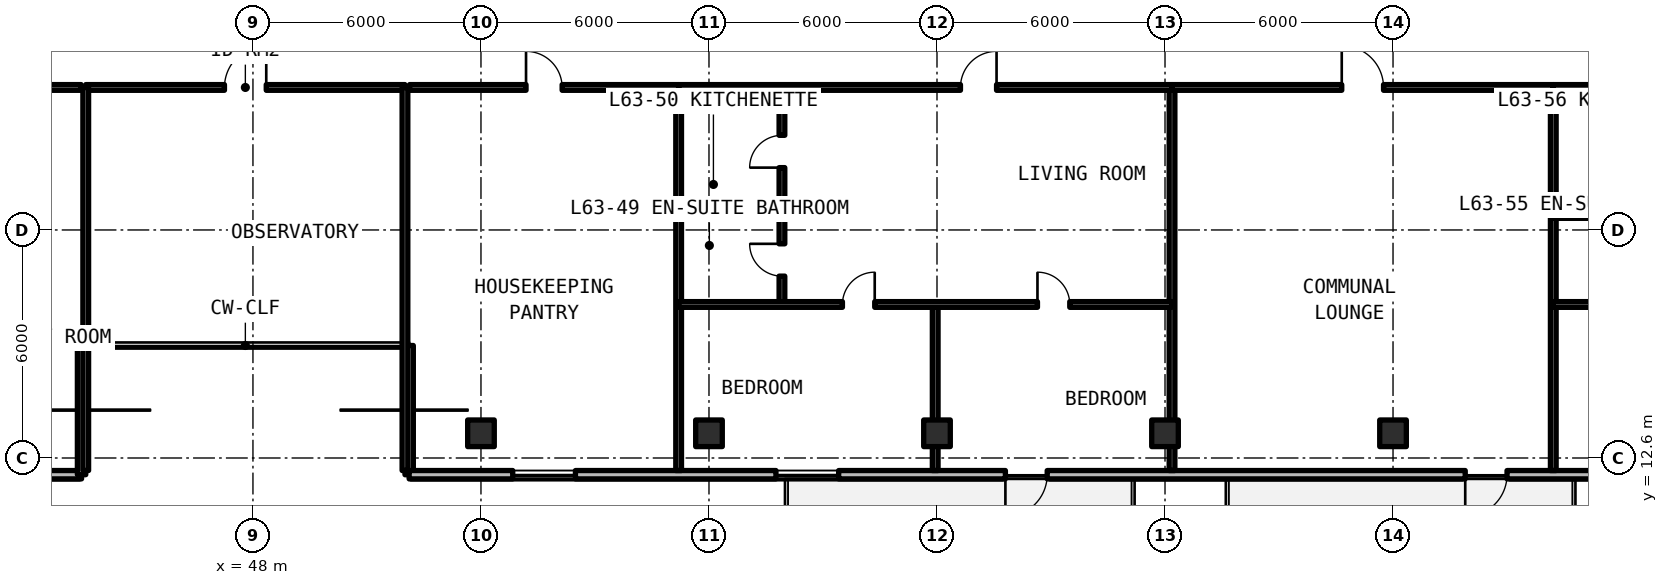
"""IFC4 building model, lengths in metres.
Left out: names, types, materials, properties, quantities, classifications, styles, units other than length and angle.
Written with IfcOpenShell. Run it as: python <this file> out.ifc"""

import sys

from ifc_helpers import new_model, si_unit, direction, frame, frame_2d, origin, origin_2d, place, context, subcontext, project, spatial, rectangle, extrude, element, fill, save


model = new_model("IFC4")
c1 = context("Model", 3, precision=1e-05, world=origin(), true_north=direction((0.0, 1.0)))
c2 = subcontext(c1, "Body", "Model", "MODEL_VIEW")
j1 = project(units=[si_unit("LENGTHUNIT", "METRE"), si_unit("PLANEANGLEUNIT", "RADIAN")], contexts=[c1])
p1 = place(None, origin())
s1 = spatial("IfcSite", under=j1, at=p1, CompositionType="ELEMENT")
p2 = place(p1, origin())
s2 = spatial("IfcBuilding", under=s1, at=p2, CompositionType="ELEMENT")
p3 = place(p2, frame((0.0, 0.0, 226.05)))
s3 = spatial("IfcBuildingStorey", under=s2, at=p3, CompositionType="ELEMENT", Elevation=226.05)
for number, where, z_axis, x_axis in (
    (1, (54.0, 13.25, 0.0), (0.0, 0.0, 1.0), (1.0, 0.0, 0.0)),
    (2, (60.0, 13.25, 0.0), (0.0, 0.0, 1.0), (1.0, 0.0, 0.0)),
    (3, (66.0, 13.25, 0.0), (0.0, 0.0, 1.0), (1.0, 0.0, 0.0)),
):
    element("IfcColumn", number, at=place(p3, frame(where, z_axis=z_axis, x_axis=x_axis)), inside=s3, PredefinedType="COLUMN", context=c2, shape_type="SweptSolid", body=[
        extrude(rectangle(XDim=0.7, YDim=0.7, at=origin_2d()), origin(), (0.0, 0.0, 1.0), 3.02),
    ])
for number, where, z_axis, x_axis in (
    (4, (72.0, 13.25, 0.0), (0.0, 0.0, 1.0), (1.0, 0.0, 0.0)),
    (5, (78.0, 13.25, 0.0), (0.0, 0.0, 1.0), (1.0, 0.0, 0.0)),
):
    element("IfcColumn", number, at=place(p3, frame(where, z_axis=z_axis, x_axis=x_axis)), inside=s3, PredefinedType="COLUMN", context=c2, shape_type="SweptSolid", body=[
        extrude(rectangle(XDim=0.7, YDim=0.7, at=origin_2d()), origin(), (0.0, 0.0, 1.0), 3.3),
    ])
p4 = place(p3, frame((25.846, 12.16, 0.0), z_axis=(0.0, 0.0, 1.0), x_axis=(1.0, 0.0, 0.0)))
e6 = element("IfcWall", 6, at=p4, inside=s3, PredefinedType="SOLIDWALL", context=c2, shape_type="SweptSolid", body=[
    extrude(rectangle(XDim=17.644, YDim=0.22, at=frame_2d((8.822, 0.0))), origin(), (0.0, 0.0, 1.0), 3.02),
])
p5 = place(p4, frame((5.904, 0.0, 0.0)))
e7 = element("IfcOpeningElement", 7, at=p5, cuts=e6, PredefinedType="OPENING", context=c2, shape_type="SweptSolid", body=[
    extrude(rectangle(XDim=1.1, YDim=2.15, at=frame_2d((0.55, 1.075))), frame((0.0, 0.12, 0.0), z_axis=(0.0, -1.0, 0.0), x_axis=(1.0, 0.0, 0.0)), (0.0, 0.0, 1.0), 0.24),
])
p6 = place(p4, frame((1.261, 0.0, 0.78)))
e8 = element("IfcOpeningElement", 8, at=p6, cuts=e6, PredefinedType="OPENING", context=c2, shape_type="SweptSolid", body=[
    extrude(rectangle(XDim=1.65, YDim=1.66, at=frame_2d((0.825, 0.83))), frame((0.0, 0.12, 0.0), z_axis=(0.0, -1.0, 0.0), x_axis=(1.0, 0.0, 0.0)), (0.0, 0.0, 1.0), 0.24),
])
p7 = place(p4, frame((11.45, 0.0, 0.78)))
e9 = element("IfcOpeningElement", 9, at=p7, cuts=e6, PredefinedType="OPENING", context=c2, shape_type="SweptSolid", body=[
    extrude(rectangle(XDim=1.65, YDim=1.66, at=frame_2d((0.825, 0.83))), frame((0.0, 0.12, 0.0), z_axis=(0.0, -1.0, 0.0), x_axis=(1.0, 0.0, 0.0)), (0.0, 0.0, 1.0), 0.24),
])
p8 = place(p4, frame((14.602, 0.0, 0.78)))
e10 = element("IfcOpeningElement", 10, at=p8, cuts=e6, PredefinedType="OPENING", context=c2, shape_type="SweptSolid", body=[
    extrude(rectangle(XDim=0.85, YDim=1.65, at=frame_2d((0.425, 0.825))), frame((0.0, 0.12, 0.0), z_axis=(0.0, -1.0, 0.0), x_axis=(1.0, 0.0, 0.0)), (0.0, 0.0, 1.0), 0.24),
])
for number, where, z_axis, x_axis in (
    (11, (43.49, 12.16, 0.0), (0.0, 0.0, 1.0), (0.0, 1.0, 0.0)),
    (12, (52.11, 15.56, 0.0), (0.0, 0.0, 1.0), (0.0, -1.0, 0.0)),
):
    element("IfcWall", number, at=place(p3, frame(where, z_axis=z_axis, x_axis=x_axis)), inside=s3, PredefinedType="SOLIDWALL", context=c2, shape_type="SweptSolid", body=[
        extrude(rectangle(XDim=3.4, YDim=0.22, at=frame_2d((1.7, 0.0))), origin(), (0.0, 0.0, 1.0), 3.02),
    ])
p9 = place(p3, frame((52.11, 12.16, 0.0), z_axis=(0.0, 0.0, 1.0), x_axis=(1.0, 0.0, 0.0)))
e13 = element("IfcWall", 13, at=p9, inside=s3, PredefinedType="SOLIDWALL", context=c2, shape_type="SweptSolid", body=[
    extrude(rectangle(XDim=43.244, YDim=0.22, at=frame_2d((21.622, 0.0))), origin(), (0.0, 0.0, 1.0), 3.02),
])
p10 = place(p9, frame((15.69, 0.0, 0.0)))
e14 = element("IfcOpeningElement", 14, at=p10, cuts=e13, PredefinedType="OPENING", context=c2, shape_type="SweptSolid", body=[
    extrude(rectangle(XDim=1.1, YDim=2.15, at=frame_2d((0.55, 1.075))), frame((0.0, 0.12, 0.0), z_axis=(0.0, -1.0, 0.0), x_axis=(1.0, 0.0, 0.0)), (0.0, 0.0, 1.0), 0.24),
])
p11 = place(p9, frame((27.79, 0.0, 0.0)))
e15 = element("IfcOpeningElement", 15, at=p11, cuts=e13, PredefinedType="OPENING", context=c2, shape_type="SweptSolid", body=[
    extrude(rectangle(XDim=1.1, YDim=2.15, at=frame_2d((0.55, 1.075))), frame((0.0, 0.12, 0.0), z_axis=(0.0, -1.0, 0.0), x_axis=(1.0, 0.0, 0.0)), (0.0, 0.0, 1.0), 0.24),
])
p12 = place(p9, frame((2.726, 0.0, 0.78)))
e16 = element("IfcOpeningElement", 16, at=p12, cuts=e13, PredefinedType="OPENING", context=c2, shape_type="SweptSolid", body=[
    extrude(rectangle(XDim=1.65, YDim=1.66, at=frame_2d((0.825, 0.83))), frame((0.0, 0.12, 0.0), z_axis=(0.0, -1.0, 0.0), x_axis=(1.0, 0.0, 0.0)), (0.0, 0.0, 1.0), 0.24),
])
p13 = place(p9, frame((9.652, 0.0, 0.78)))
e17 = element("IfcOpeningElement", 17, at=p13, cuts=e13, PredefinedType="OPENING", context=c2, shape_type="SweptSolid", body=[
    extrude(rectangle(XDim=1.65, YDim=1.66, at=frame_2d((0.825, 0.83))), frame((0.0, 0.12, 0.0), z_axis=(0.0, -1.0, 0.0), x_axis=(1.0, 0.0, 0.0)), (0.0, 0.0, 1.0), 0.24),
])
p14 = place(p9, frame((32.667, 0.0, 0.78)))
e18 = element("IfcOpeningElement", 18, at=p14, cuts=e13, PredefinedType="OPENING", context=c2, shape_type="SweptSolid", body=[
    extrude(rectangle(XDim=1.65, YDim=1.66, at=frame_2d((0.825, 0.83))), frame((0.0, 0.12, 0.0), z_axis=(0.0, -1.0, 0.0), x_axis=(1.0, 0.0, 0.0)), (0.0, 0.0, 1.0), 0.24),
])
p15 = place(p9, frame((39.139, 0.0, 0.78)))
e19 = element("IfcOpeningElement", 19, at=p15, cuts=e13, PredefinedType="OPENING", context=c2, shape_type="SweptSolid", body=[
    extrude(rectangle(XDim=1.65, YDim=1.66, at=frame_2d((0.825, 0.83))), frame((0.0, 0.12, 0.0), z_axis=(0.0, -1.0, 0.0), x_axis=(1.0, 0.0, 0.0)), (0.0, 0.0, 1.0), 0.24),
])
p16 = place(p3, frame((43.6, 22.35, 0.0), z_axis=(0.0, 0.0, 1.0), x_axis=(1.0, 0.0, 0.0)))
e20 = element("IfcWall", 20, at=p16, inside=s3, PredefinedType="SOLIDWALL", context=c2, shape_type="SweptSolid", body=[
    extrude(rectangle(XDim=8.4, YDim=0.15, at=frame_2d((4.2, 0.0))), origin(), (0.0, 0.0, 1.0), 2.35),
])
p17 = place(p16, frame((3.65, 0.0, 0.0)))
e21 = element("IfcOpeningElement", 21, at=p17, cuts=e20, PredefinedType="OPENING", context=c2, shape_type="SweptSolid", body=[
    extrude(rectangle(XDim=1.1, YDim=2.15, at=frame_2d((0.55, 1.075))), frame((0.0, 0.085, 0.0), z_axis=(0.0, -1.0, 0.0), x_axis=(1.0, 0.0, 0.0)), (0.0, 0.0, 1.0), 0.17),
])
for number, where, z_axis, x_axis in (
    (22, (43.6, 12.27, 0.0), (0.0, 0.0, 1.0), (0.0, 1.0, 0.0)),
    (23, (52.0, 12.27, 0.0), (0.0, 0.0, 1.0), (0.0, 1.0, 0.0)),
):
    element("IfcWall", number, at=place(p3, frame(where, z_axis=z_axis, x_axis=x_axis)), inside=s3, PredefinedType="SOLIDWALL", context=c2, shape_type="SweptSolid", body=[
        extrude(rectangle(XDim=10.08, YDim=0.15, at=frame_2d((5.04, 0.0))), origin(), (0.0, 0.0, 1.0), 2.35),
    ])
p18 = place(p3, frame((39.866, 22.35, 0.0), z_axis=(0.0, 0.0, 1.0), x_axis=(1.0, 0.0, 0.0)))
e24 = element("IfcWall", 24, at=p18, inside=s3, PredefinedType="SOLIDWALL", context=c2, shape_type="SweptSolid", body=[
    extrude(rectangle(XDim=3.614, YDim=0.15, at=frame_2d((1.807, 0.0))), origin(), (0.0, 0.0, 1.0), 2.35),
])
p19 = place(p18, frame((1.332, 0.0, 0.0)))
e25 = element("IfcOpeningElement", 25, at=p19, cuts=e24, PredefinedType="OPENING", context=c2, shape_type="SweptSolid", body=[
    extrude(rectangle(XDim=0.95, YDim=2.15, at=frame_2d((0.475, 1.075))), frame((0.0, 0.085, 0.0), z_axis=(0.0, -1.0, 0.0), x_axis=(1.0, 0.0, 0.0)), (0.0, 0.0, 1.0), 0.17),
])
p20 = place(p3, frame((59.202, 12.27, 0.0), z_axis=(0.0, 0.0, 1.0), x_axis=(0.0, 1.0, 0.0)))
e26 = element("IfcWall", 26, at=p20, inside=s3, PredefinedType="SOLIDWALL", context=c2, shape_type="SweptSolid", body=[
    extrude(rectangle(XDim=10.08, YDim=0.15, at=frame_2d((5.04, 0.0))), origin(), (0.0, 0.0, 1.0), 2.35),
])
p21 = place(p3, frame((52.12, 22.35, 0.0), z_axis=(0.0, 0.0, 1.0), x_axis=(1.0, 0.0, 0.0)))
e27 = element("IfcWall", 27, at=p21, inside=s3, PredefinedType="SOLIDWALL", context=c2, shape_type="SweptSolid", body=[
    extrude(rectangle(XDim=7.082, YDim=0.15, at=frame_2d((3.541, 0.0))), origin(), (0.0, 0.0, 1.0), 2.35),
])
p22 = place(p21, frame((3.066, 0.0, 0.0)))
e28 = element("IfcOpeningElement", 28, at=p22, cuts=e27, PredefinedType="OPENING", context=c2, shape_type="SweptSolid", body=[
    extrude(rectangle(XDim=0.95, YDim=2.15, at=frame_2d((0.475, 1.075))), frame((0.0, 0.085, 0.0), z_axis=(0.0, -1.0, 0.0), x_axis=(1.0, 0.0, 0.0)), (0.0, 0.0, 1.0), 0.17),
])
p23 = place(p3, frame((72.185, 12.27, 0.0), z_axis=(0.0, 0.0, 1.0), x_axis=(0.0, 1.0, 0.0)))
e29 = element("IfcWall", 29, at=p23, inside=s3, PredefinedType="SOLIDWALL", context=c2, shape_type="SweptSolid", body=[
    extrude(rectangle(XDim=10.08, YDim=0.15, at=frame_2d((5.04, 0.0))), origin(), (0.0, 0.0, 1.0), 2.35),
])
p24 = place(p3, frame((59.202, 18.981, 0.0), z_axis=(0.0, 0.0, 1.0), x_axis=(1.0, 0.0, 0.0)))
e30 = element("IfcWall", 30, at=p24, inside=s3, PredefinedType="PARTITIONING", context=c2, shape_type="SweptSolid", body=[
    extrude(rectangle(XDim=2.718, YDim=0.15, at=frame_2d((1.359, 0.0))), origin(), (0.0, 0.0, 1.0), 2.35),
])
p25 = place(p3, frame((61.92, 16.64, 0.0), z_axis=(0.0, 0.0, 1.0), x_axis=(0.0, 1.0, 0.0)))
e31 = element("IfcWall", 31, at=p25, inside=s3, PredefinedType="PARTITIONING", context=c2, shape_type="SweptSolid", body=[
    extrude(rectangle(XDim=5.71, YDim=0.15, at=frame_2d((2.855, 0.0))), origin(), (0.0, 0.0, 1.0), 2.35),
])
p26 = place(p25, frame((0.746, 0.0, 0.0)))
e32 = element("IfcOpeningElement", 32, at=p26, cuts=e31, PredefinedType="OPENING", context=c2, shape_type="SweptSolid", body=[
    extrude(rectangle(XDim=0.85, YDim=2.1, at=frame_2d((0.425, 1.05))), frame((0.0, 0.085, 0.0), z_axis=(0.0, -1.0, 0.0), x_axis=(1.0, 0.0, 0.0)), (0.0, 0.0, 1.0), 0.17),
])
p27 = place(p25, frame((3.601, 0.0, 0.0)))
e33 = element("IfcOpeningElement", 33, at=p27, cuts=e31, PredefinedType="OPENING", context=c2, shape_type="SweptSolid", body=[
    extrude(rectangle(XDim=0.85, YDim=2.1, at=frame_2d((0.425, 1.05))), frame((0.0, 0.085, 0.0), z_axis=(0.0, -1.0, 0.0), x_axis=(1.0, 0.0, 0.0)), (0.0, 0.0, 1.0), 0.17),
])
p28 = place(p3, frame((65.953, 12.27, 0.0), z_axis=(0.0, 0.0, 1.0), x_axis=(0.0, 1.0, 0.0)))
e34 = element("IfcWall", 34, at=p28, inside=s3, PredefinedType="PARTITIONING", context=c2, shape_type="SweptSolid", body=[
    extrude(rectangle(XDim=4.37, YDim=0.15, at=frame_2d((2.185, 0.0))), origin(), (0.0, 0.0, 1.0), 2.35),
])
p29 = place(p3, frame((59.202, 16.64, 0.0), z_axis=(0.0, 0.0, 1.0), x_axis=(1.0, 0.0, 0.0)))
e35 = element("IfcWall", 35, at=p29, inside=s3, PredefinedType="PARTITIONING", context=c2, shape_type="SweptSolid", body=[
    extrude(rectangle(XDim=12.983, YDim=0.15, at=frame_2d((6.491, 0.0))), origin(), (0.0, 0.0, 1.0), 2.35),
])
p30 = place(p29, frame((4.31, 0.0, 0.0)))
e36 = element("IfcOpeningElement", 36, at=p30, cuts=e35, PredefinedType="OPENING", context=c2, shape_type="SweptSolid", body=[
    extrude(rectangle(XDim=0.85, YDim=2.1, at=frame_2d((0.425, 1.05))), frame((0.0, 0.085, 0.0), z_axis=(0.0, -1.0, 0.0), x_axis=(1.0, 0.0, 0.0)), (0.0, 0.0, 1.0), 0.17),
])
p31 = place(p29, frame((9.442, 0.0, 0.0)))
e37 = element("IfcOpeningElement", 37, at=p31, cuts=e35, PredefinedType="OPENING", context=c2, shape_type="SweptSolid", body=[
    extrude(rectangle(XDim=0.85, YDim=2.1, at=frame_2d((0.425, 1.05))), frame((0.0, 0.085, 0.0), z_axis=(0.0, -1.0, 0.0), x_axis=(1.0, 0.0, 0.0)), (0.0, 0.0, 1.0), 0.17),
])
p32 = place(p3, frame((59.202, 22.35, 0.0), z_axis=(0.0, 0.0, 1.0), x_axis=(1.0, 0.0, 0.0)))
e38 = element("IfcWall", 38, at=p32, inside=s3, PredefinedType="SOLIDWALL", context=c2, shape_type="SweptSolid", body=[
    extrude(rectangle(XDim=12.983, YDim=0.15, at=frame_2d((6.491, 0.0))), origin(), (0.0, 0.0, 1.0), 2.35),
])
p33 = place(p32, frame((7.416, 0.0, 0.0)))
e39 = element("IfcOpeningElement", 39, at=p33, cuts=e38, PredefinedType="OPENING", context=c2, shape_type="SweptSolid", body=[
    extrude(rectangle(XDim=0.95, YDim=2.15, at=frame_2d((0.475, 1.075))), frame((0.0, 0.085, 0.0), z_axis=(0.0, -1.0, 0.0), x_axis=(1.0, 0.0, 0.0)), (0.0, 0.0, 1.0), 0.17),
])
p34 = place(p3, frame((82.217, 12.27, 0.0), z_axis=(0.0, 0.0, 1.0), x_axis=(0.0, 1.0, 0.0)))
e40 = element("IfcWall", 40, at=p34, inside=s3, PredefinedType="SOLIDWALL", context=c2, shape_type="SweptSolid", body=[
    extrude(rectangle(XDim=10.08, YDim=0.15, at=frame_2d((5.04, 0.0))), origin(), (0.0, 0.0, 1.0), 2.35),
])
p35 = place(p3, frame((72.185, 22.35, 0.0), z_axis=(0.0, 0.0, 1.0), x_axis=(1.0, 0.0, 0.0)))
e41 = element("IfcWall", 41, at=p35, inside=s3, PredefinedType="SOLIDWALL", context=c2, shape_type="SweptSolid", body=[
    extrude(rectangle(XDim=10.032, YDim=0.15, at=frame_2d((5.016, 0.0))), origin(), (0.0, 0.0, 1.0), 2.35),
])
p36 = place(p35, frame((4.466, 0.0, 0.0)))
e42 = element("IfcOpeningElement", 42, at=p36, cuts=e41, PredefinedType="OPENING", context=c2, shape_type="SweptSolid", body=[
    extrude(rectangle(XDim=1.1, YDim=2.15, at=frame_2d((0.55, 1.075))), frame((0.0, 0.085, 0.0), z_axis=(0.0, -1.0, 0.0), x_axis=(1.0, 0.0, 0.0)), (0.0, 0.0, 1.0), 0.17),
])
p37 = place(p3, frame((82.217, 18.981, 0.0), z_axis=(0.0, 0.0, 1.0), x_axis=(1.0, 0.0, 0.0)))
e43 = element("IfcWall", 43, at=p37, inside=s3, PredefinedType="PARTITIONING", context=c2, shape_type="SweptSolid", body=[
    extrude(rectangle(XDim=3.703, YDim=0.15, at=frame_2d((1.852, 0.0))), origin(), (0.0, 0.0, 1.0), 2.35),
])
p38 = place(p3, frame((82.217, 16.64, 0.0), z_axis=(0.0, 0.0, 1.0), x_axis=(1.0, 0.0, 0.0)))
e44 = element("IfcWall", 44, at=p38, inside=s3, PredefinedType="PARTITIONING", context=c2, shape_type="SweptSolid", body=[
    extrude(rectangle(XDim=12.983, YDim=0.15, at=frame_2d((6.492, 0.0))), origin(), (0.0, 0.0, 1.0), 2.35),
])
p39 = place(p38, frame((4.802, 0.0, 0.0)))
e45 = element("IfcOpeningElement", 45, at=p39, cuts=e44, PredefinedType="OPENING", context=c2, shape_type="SweptSolid", body=[
    extrude(rectangle(XDim=0.85, YDim=2.1, at=frame_2d((0.425, 1.05))), frame((0.0, 0.085, 0.0), z_axis=(0.0, -1.0, 0.0), x_axis=(1.0, 0.0, 0.0)), (0.0, 0.0, 1.0), 0.17),
])
p40 = place(p38, frame((9.442, 0.0, 0.0)))
e46 = element("IfcOpeningElement", 46, at=p40, cuts=e44, PredefinedType="OPENING", context=c2, shape_type="SweptSolid", body=[
    extrude(rectangle(XDim=0.85, YDim=2.1, at=frame_2d((0.425, 1.05))), frame((0.0, 0.085, 0.0), z_axis=(0.0, -1.0, 0.0), x_axis=(1.0, 0.0, 0.0)), (0.0, 0.0, 1.0), 0.17),
])
p41 = place(p3, frame((82.217, 22.35, 0.0), z_axis=(0.0, 0.0, 1.0), x_axis=(1.0, 0.0, 0.0)))
e47 = element("IfcWall", 47, at=p41, inside=s3, PredefinedType="SOLIDWALL", context=c2, shape_type="SweptSolid", body=[
    extrude(rectangle(XDim=12.983, YDim=0.15, at=frame_2d((6.492, 0.0))), origin(), (0.0, 0.0, 1.0), 2.35),
])
p42 = place(p41, frame((7.908, 0.0, 0.0)))
e48 = element("IfcOpeningElement", 48, at=p42, cuts=e47, PredefinedType="OPENING", context=c2, shape_type="SweptSolid", body=[
    extrude(rectangle(XDim=0.95, YDim=2.15, at=frame_2d((0.475, 1.075))), frame((0.0, 0.085, 0.0), z_axis=(0.0, -1.0, 0.0), x_axis=(1.0, 0.0, 0.0)), (0.0, 0.0, 1.0), 0.17),
])
p43 = place(p10, frame((1.1, 0.0, 0.0), z_axis=(0.0, 0.0, 1.0), x_axis=(-1.0, 0.0, 0.0)))
e49 = element("IfcDoor", 49, at=p43, inside=s3, OperationType="SINGLE_SWING_RIGHT", PredefinedType="DOOR", context=c2, shape_type="SweptSolid", body=[
    extrude(rectangle(XDim=1.1, YDim=2.15, at=frame_2d((0.55, 1.075))), frame((0.0, 0.025, 0.0), z_axis=(0.0, -1.0, 0.0), x_axis=(1.0, 0.0, 0.0)), (0.0, 0.0, 1.0), 0.05),
])
fill(e14, e49)
p44 = place(p11, frame((1.1, 0.0, 0.0), z_axis=(0.0, 0.0, 1.0), x_axis=(-1.0, 0.0, 0.0)))
e50 = element("IfcDoor", 50, at=p44, inside=s3, OperationType="SINGLE_SWING_LEFT", PredefinedType="DOOR", context=c2, shape_type="SweptSolid", body=[
    extrude(rectangle(XDim=1.1, YDim=2.15, at=frame_2d((0.55, 1.075))), frame((0.0, 0.025, 0.0), z_axis=(0.0, -1.0, 0.0), x_axis=(1.0, 0.0, 0.0)), (0.0, 0.0, 1.0), 0.05),
])
fill(e15, e50)
p45 = place(p12, origin())
e51 = element("IfcWindow", 51, at=p45, inside=s3, PartitioningType="SINGLE_PANEL", PredefinedType="WINDOW", context=c2, shape_type="SweptSolid", body=[
    extrude(rectangle(XDim=1.65, YDim=1.66, at=frame_2d((0.825, 0.83))), frame((0.0, 0.03, 0.0), z_axis=(0.0, -1.0, 0.0), x_axis=(1.0, 0.0, 0.0)), (0.0, 0.0, 1.0), 0.06),
])
fill(e16, e51)
p46 = place(p13, origin())
e52 = element("IfcWindow", 52, at=p46, inside=s3, PartitioningType="SINGLE_PANEL", PredefinedType="WINDOW", context=c2, shape_type="SweptSolid", body=[
    extrude(rectangle(XDim=1.65, YDim=1.66, at=frame_2d((0.825, 0.83))), frame((0.0, 0.03, 0.0), z_axis=(0.0, -1.0, 0.0), x_axis=(1.0, 0.0, 0.0)), (0.0, 0.0, 1.0), 0.06),
])
fill(e17, e52)
p47 = place(p17, origin())
e53 = element("IfcDoor", 53, at=p47, inside=s3, OperationType="SINGLE_SWING_RIGHT", PredefinedType="DOOR", context=c2, shape_type="SweptSolid", body=[
    extrude(rectangle(XDim=1.1, YDim=2.15, at=frame_2d((0.55, 1.075))), frame((0.0, 0.025, 0.0), z_axis=(0.0, -1.0, 0.0), x_axis=(1.0, 0.0, 0.0)), (0.0, 0.0, 1.0), 0.05),
])
fill(e21, e53)
p48 = place(p22, origin())
e54 = element("IfcDoor", 54, at=p48, inside=s3, OperationType="SINGLE_SWING_LEFT", PredefinedType="DOOR", context=c2, shape_type="SweptSolid", body=[
    extrude(rectangle(XDim=0.95, YDim=2.15, at=frame_2d((0.475, 1.075))), frame((0.0, 0.025, 0.0), z_axis=(0.0, -1.0, 0.0), x_axis=(1.0, 0.0, 0.0)), (0.0, 0.0, 1.0), 0.05),
])
fill(e28, e54)
p49 = place(p26, origin())
e55 = element("IfcDoor", 55, at=p49, inside=s3, OperationType="SINGLE_SWING_RIGHT", PredefinedType="DOOR", context=c2, shape_type="SweptSolid", body=[
    extrude(rectangle(XDim=0.85, YDim=2.1, at=frame_2d((0.425, 1.05))), frame((0.0, 0.025, 0.0), z_axis=(0.0, -1.0, 0.0), x_axis=(1.0, 0.0, 0.0)), (0.0, 0.0, 1.0), 0.05),
])
fill(e32, e55)
p50 = place(p27, origin())
e56 = element("IfcDoor", 56, at=p50, inside=s3, OperationType="SINGLE_SWING_LEFT", PredefinedType="DOOR", context=c2, shape_type="SweptSolid", body=[
    extrude(rectangle(XDim=0.85, YDim=2.1, at=frame_2d((0.425, 1.05))), frame((0.0, 0.025, 0.0), z_axis=(0.0, -1.0, 0.0), x_axis=(1.0, 0.0, 0.0)), (0.0, 0.0, 1.0), 0.05),
])
fill(e33, e56)
p51 = place(p30, origin())
e57 = element("IfcDoor", 57, at=p51, inside=s3, OperationType="SINGLE_SWING_RIGHT", PredefinedType="DOOR", context=c2, shape_type="SweptSolid", body=[
    extrude(rectangle(XDim=0.85, YDim=2.1, at=frame_2d((0.425, 1.05))), frame((0.0, 0.025, 0.0), z_axis=(0.0, -1.0, 0.0), x_axis=(1.0, 0.0, 0.0)), (0.0, 0.0, 1.0), 0.05),
])
fill(e36, e57)
p52 = place(p31, origin())
e58 = element("IfcDoor", 58, at=p52, inside=s3, OperationType="SINGLE_SWING_LEFT", PredefinedType="DOOR", context=c2, shape_type="SweptSolid", body=[
    extrude(rectangle(XDim=0.85, YDim=2.1, at=frame_2d((0.425, 1.05))), frame((0.0, 0.025, 0.0), z_axis=(0.0, -1.0, 0.0), x_axis=(1.0, 0.0, 0.0)), (0.0, 0.0, 1.0), 0.05),
])
fill(e37, e58)
p53 = place(p33, origin())
e59 = element("IfcDoor", 59, at=p53, inside=s3, OperationType="SINGLE_SWING_RIGHT", PredefinedType="DOOR", context=c2, shape_type="SweptSolid", body=[
    extrude(rectangle(XDim=0.95, YDim=2.15, at=frame_2d((0.475, 1.075))), frame((0.0, 0.025, 0.0), z_axis=(0.0, -1.0, 0.0), x_axis=(1.0, 0.0, 0.0)), (0.0, 0.0, 1.0), 0.05),
])
fill(e39, e59)
p54 = place(p36, origin())
e60 = element("IfcDoor", 60, at=p54, inside=s3, OperationType="SINGLE_SWING_LEFT", PredefinedType="DOOR", context=c2, shape_type="SweptSolid", body=[
    extrude(rectangle(XDim=1.1, YDim=2.15, at=frame_2d((0.55, 1.075))), frame((0.0, 0.025, 0.0), z_axis=(0.0, -1.0, 0.0), x_axis=(1.0, 0.0, 0.0)), (0.0, 0.0, 1.0), 0.05),
])
fill(e42, e60)
save(model, sys.argv[1])
